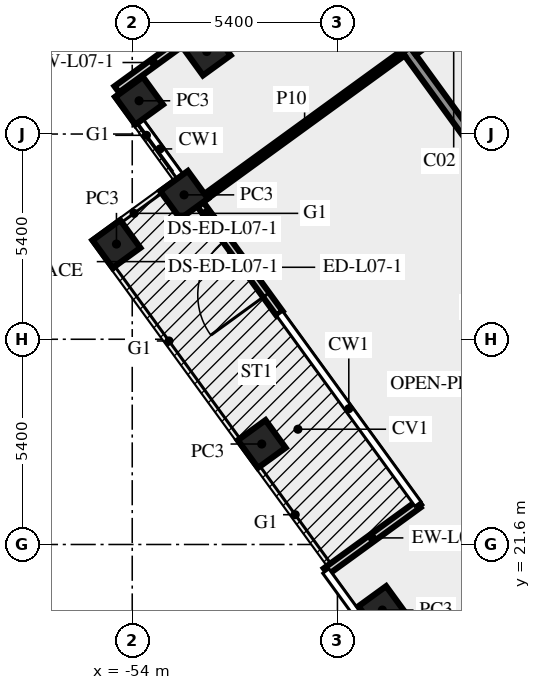
"""IFC4 building model, lengths in metres.
Left out: names, types, materials, properties, quantities, classifications, styles, units other than length and angle.
Written with IfcOpenShell. Run it as: python <this file> out.ifc"""

import sys

from ifc_helpers import new_model, si_unit, direction, frame, frame_2d, origin, origin_2d, place, context, subcontext, project, spatial, rectangle, extrude, element, fill, save


model = new_model("IFC4")
c1 = context("Model", 3, precision=1e-05, world=origin(), true_north=direction((0.0, 1.0)))
c2 = subcontext(c1, "Body", "Model", "MODEL_VIEW")
j1 = project(units=[si_unit("LENGTHUNIT", "METRE"), si_unit("PLANEANGLEUNIT", "RADIAN")], contexts=[c1])
p1 = place(None, origin())
s1 = spatial("IfcSite", under=j1, at=p1, CompositionType="ELEMENT")
p2 = place(p1, origin())
s2 = spatial("IfcBuilding", under=s1, at=p2, CompositionType="ELEMENT")
p3 = place(p2, frame((0.0, 0.0, 35.0)))
s3 = spatial("IfcBuildingStorey", under=s2, at=p3, CompositionType="ELEMENT", Elevation=35.0)
for number, where, z_axis, x_axis in (
    (1, (-52.039, 34.571, 0.0), (0.0, 0.0, 1.0), (-0.809, -0.588, 0.0)),
    (2, (-53.82, 33.275, 0.0), (0.0, 0.0, 1.0), (0.588, -0.809, 0.0)),
    (3, (-52.636, 30.8, 0.0), (0.0, 0.0, 1.0), (-0.809, -0.588, 0.0)),
    (4, (-54.415, 29.505, 0.0), (0.0, 0.0, 1.0), (0.588, -0.809, 0.0)),
    (5, (-50.592, 24.243, 0.0), (0.0, 0.0, 1.0), (0.588, -0.809, 0.0)),
    (6, (-47.418, 19.875, 0.0), (0.0, 0.0, 1.0), (0.588, -0.809, 0.0)),
):
    element("IfcColumn", number, at=place(p3, frame(where, z_axis=z_axis, x_axis=x_axis)), inside=s3, PredefinedType="COLUMN", context=c2, shape_type="SweptSolid", body=[
        extrude(rectangle(XDim=0.9, YDim=0.9, at=origin_2d()), origin(), (0.0, 0.0, 1.0), 3.65),
    ])
p4 = place(p3, frame((-52.465, 34.987, 0.0), z_axis=(0.0, 0.0, 1.0), x_axis=(-0.809026317077, -0.587772420479, 0.0)))
e7 = element("IfcWall", 7, at=p4, inside=s3, PredefinedType="SOLIDWALL", context=c2, shape_type="SweptSolid", body=[
    extrude(rectangle(XDim=2.4, YDim=0.2, at=frame_2d((1.2, 0.0))), origin(), (0.0, 0.0, 1.0), 3.65),
])
p5 = place(p3, frame((-50.123, 27.68, 0.0), z_axis=(0.0, 0.0, 1.0), x_axis=(-0.587755461469, 0.809038637837, 0.0)))
e8 = element("IfcWall", 8, at=p5, inside=s3, PredefinedType="SOLIDWALL", context=c2, shape_type="SweptSolid", body=[
    extrude(rectangle(XDim=3.0, YDim=0.2, at=frame_2d((1.5, 0.0))), origin(), (0.0, 0.0, 1.0), 3.65),
])
p6 = place(p5, frame((0.6, 0.0, 0.0)))
e9 = element("IfcOpeningElement", 9, at=p6, cuts=e8, PredefinedType="OPENING", context=c2, shape_type="SweptSolid", body=[
    extrude(rectangle(XDim=1.8, YDim=2.4, at=frame_2d((0.9, 1.2))), frame((0.0, 0.11, 0.0), z_axis=(0.0, -1.0, 0.0), x_axis=(1.0, 0.0, 0.0)), (0.0, 0.0, 1.0), 0.22),
])
p7 = place(p3, frame((-46.472, 22.655, 0.0), z_axis=(0.0, 0.0, 1.0), x_axis=(-0.809038637837, -0.587755461469, 0.0)))
e10 = element("IfcWall", 10, at=p7, inside=s3, PredefinedType="SOLIDWALL", context=c2, shape_type="SweptSolid", body=[
    extrude(rectangle(XDim=3.0, YDim=0.2, at=frame_2d((1.5, 0.0))), origin(), (0.0, 0.0, 1.0), 3.65),
])
p8 = place(p3, frame((-20.531, -1.523, 0.0), z_axis=(0.0, 0.0, 1.0), x_axis=(-0.587784593204, 0.809017473231, 0.0)))
e11 = element("IfcWall", 11, at=p8, inside=s3, PredefinedType="SOLIDWALL", context=c2, shape_type="SweptSolid", body=[
    extrude(rectangle(XDim=44.67, YDim=0.25, at=frame_2d((22.335, 0.0))), origin(), (0.0, 0.0, 1.0), 3.65),
])
p9 = place(p8, frame((30.765, 0.0, 0.0)))
e12 = element("IfcOpeningElement", 12, at=p9, cuts=e11, PredefinedType="OPENING", context=c2, shape_type="SweptSolid", body=[
    extrude(rectangle(XDim=0.9, YDim=2.1, at=frame_2d((0.45, 1.05))), frame((0.0, 0.135, 0.0), z_axis=(0.0, -1.0, 0.0), x_axis=(1.0, 0.0, 0.0)), (0.0, 0.0, 1.0), 0.27),
])
p10 = place(p8, frame((14.316, 0.0, 0.0)))
e13 = element("IfcOpeningElement", 13, at=p10, cuts=e11, PredefinedType="OPENING", context=c2, shape_type="SweptSolid", body=[
    extrude(rectangle(XDim=0.9, YDim=2.1, at=frame_2d((0.45, 1.05))), frame((0.0, 0.135, 0.0), z_axis=(0.0, -1.0, 0.0), x_axis=(1.0, 0.0, 0.0)), (0.0, 0.0, 1.0), 0.27),
])
p11 = place(p8, frame((29.166, 0.0, 0.0)))
e14 = element("IfcOpeningElement", 14, at=p11, cuts=e11, PredefinedType="OPENING", context=c2, shape_type="SweptSolid", body=[
    extrude(rectangle(XDim=0.9, YDim=2.1, at=frame_2d((0.45, 1.05))), frame((0.0, 0.135, 0.0), z_axis=(0.0, -1.0, 0.0), x_axis=(1.0, 0.0, 0.0)), (0.0, 0.0, 1.0), 0.27),
])
p12 = place(p3, frame((-46.613, 34.588, 0.0), z_axis=(0.0, 0.0, 1.0), x_axis=(0.808994936898, 0.587815610607, 0.0)))
e15 = element("IfcWall", 15, at=p12, inside=s3, PredefinedType="SOLIDWALL", context=c2, shape_type="SweptSolid", body=[
    extrude(rectangle(XDim=2.65, YDim=0.25, at=frame_2d((1.325, 0.0))), origin(), (0.0, 0.0, 1.0), 3.65),
])
p13 = place(p12, frame((0.299, 0.0, 0.0)))
e16 = element("IfcOpeningElement", 16, at=p13, cuts=e15, PredefinedType="OPENING", context=c2, shape_type="SweptSolid", body=[
    extrude(rectangle(XDim=1.8, YDim=2.1, at=frame_2d((0.9, 1.05))), frame((0.0, 0.135, 0.0), z_axis=(0.0, -1.0, 0.0), x_axis=(1.0, 0.0, 0.0)), (0.0, 0.0, 1.0), 0.27),
])
p14 = place(p3, frame((-46.877, 34.526, 0.0), z_axis=(0.0, 0.0, 1.0), x_axis=(-0.809011722304, -0.587792508607, 0.0)))
e17 = element("IfcWall", 17, at=p14, inside=s3, PredefinedType="PARTITIONING", context=c2, shape_type="SweptSolid", body=[
    extrude(rectangle(XDim=6.394, YDim=0.15, at=frame_2d((3.197, 0.0))), origin(), (0.0, 0.0, 1.0), 3.65),
])
p15 = place(p3, frame((-46.248, 17.413, 0.0), z_axis=(0.0, 0.0, 1.0), x_axis=(0.80900684162, 0.587799226107, 0.0)))
e18 = element("IfcWall", 18, at=p15, inside=s3, PredefinedType="PARTITIONING", context=c2, shape_type="SweptSolid", body=[
    extrude(rectangle(XDim=9.55, YDim=0.15, at=frame_2d((4.775, 0.0))), origin(), (0.0, 0.0, 1.0), 2.75),
])
p16 = place(p3, frame((-51.887, 30.107, 0.0), z_axis=(0.0, 0.0, 1.0), x_axis=(-0.587825586486, 0.808987688332, 0.0)))
e19 = element("IfcWall", 19, at=p16, inside=s3, PredefinedType="SOLIDWALL", context=c2, shape_type="SweptSolid", body=[
    extrude(rectangle(XDim=0.545, YDim=0.2, at=frame_2d((0.273, 0.0))), origin(), (0.0, 0.0, 1.0), 3.65),
])
p17 = place(p6, origin())
e20 = element("IfcDoor", 20, at=p17, inside=s3, OperationType="DOUBLE_DOOR_SINGLE_SWING", PredefinedType="DOOR", context=c2, shape_type="SweptSolid", body=[
    extrude(rectangle(XDim=1.8, YDim=2.4, at=frame_2d((0.9, 1.2))), frame((0.0, 0.025, 0.0), z_axis=(0.0, -1.0, 0.0), x_axis=(1.0, 0.0, 0.0)), (0.0, 0.0, 1.0), 0.05),
])
fill(e9, e20)
save(model, sys.argv[1])
